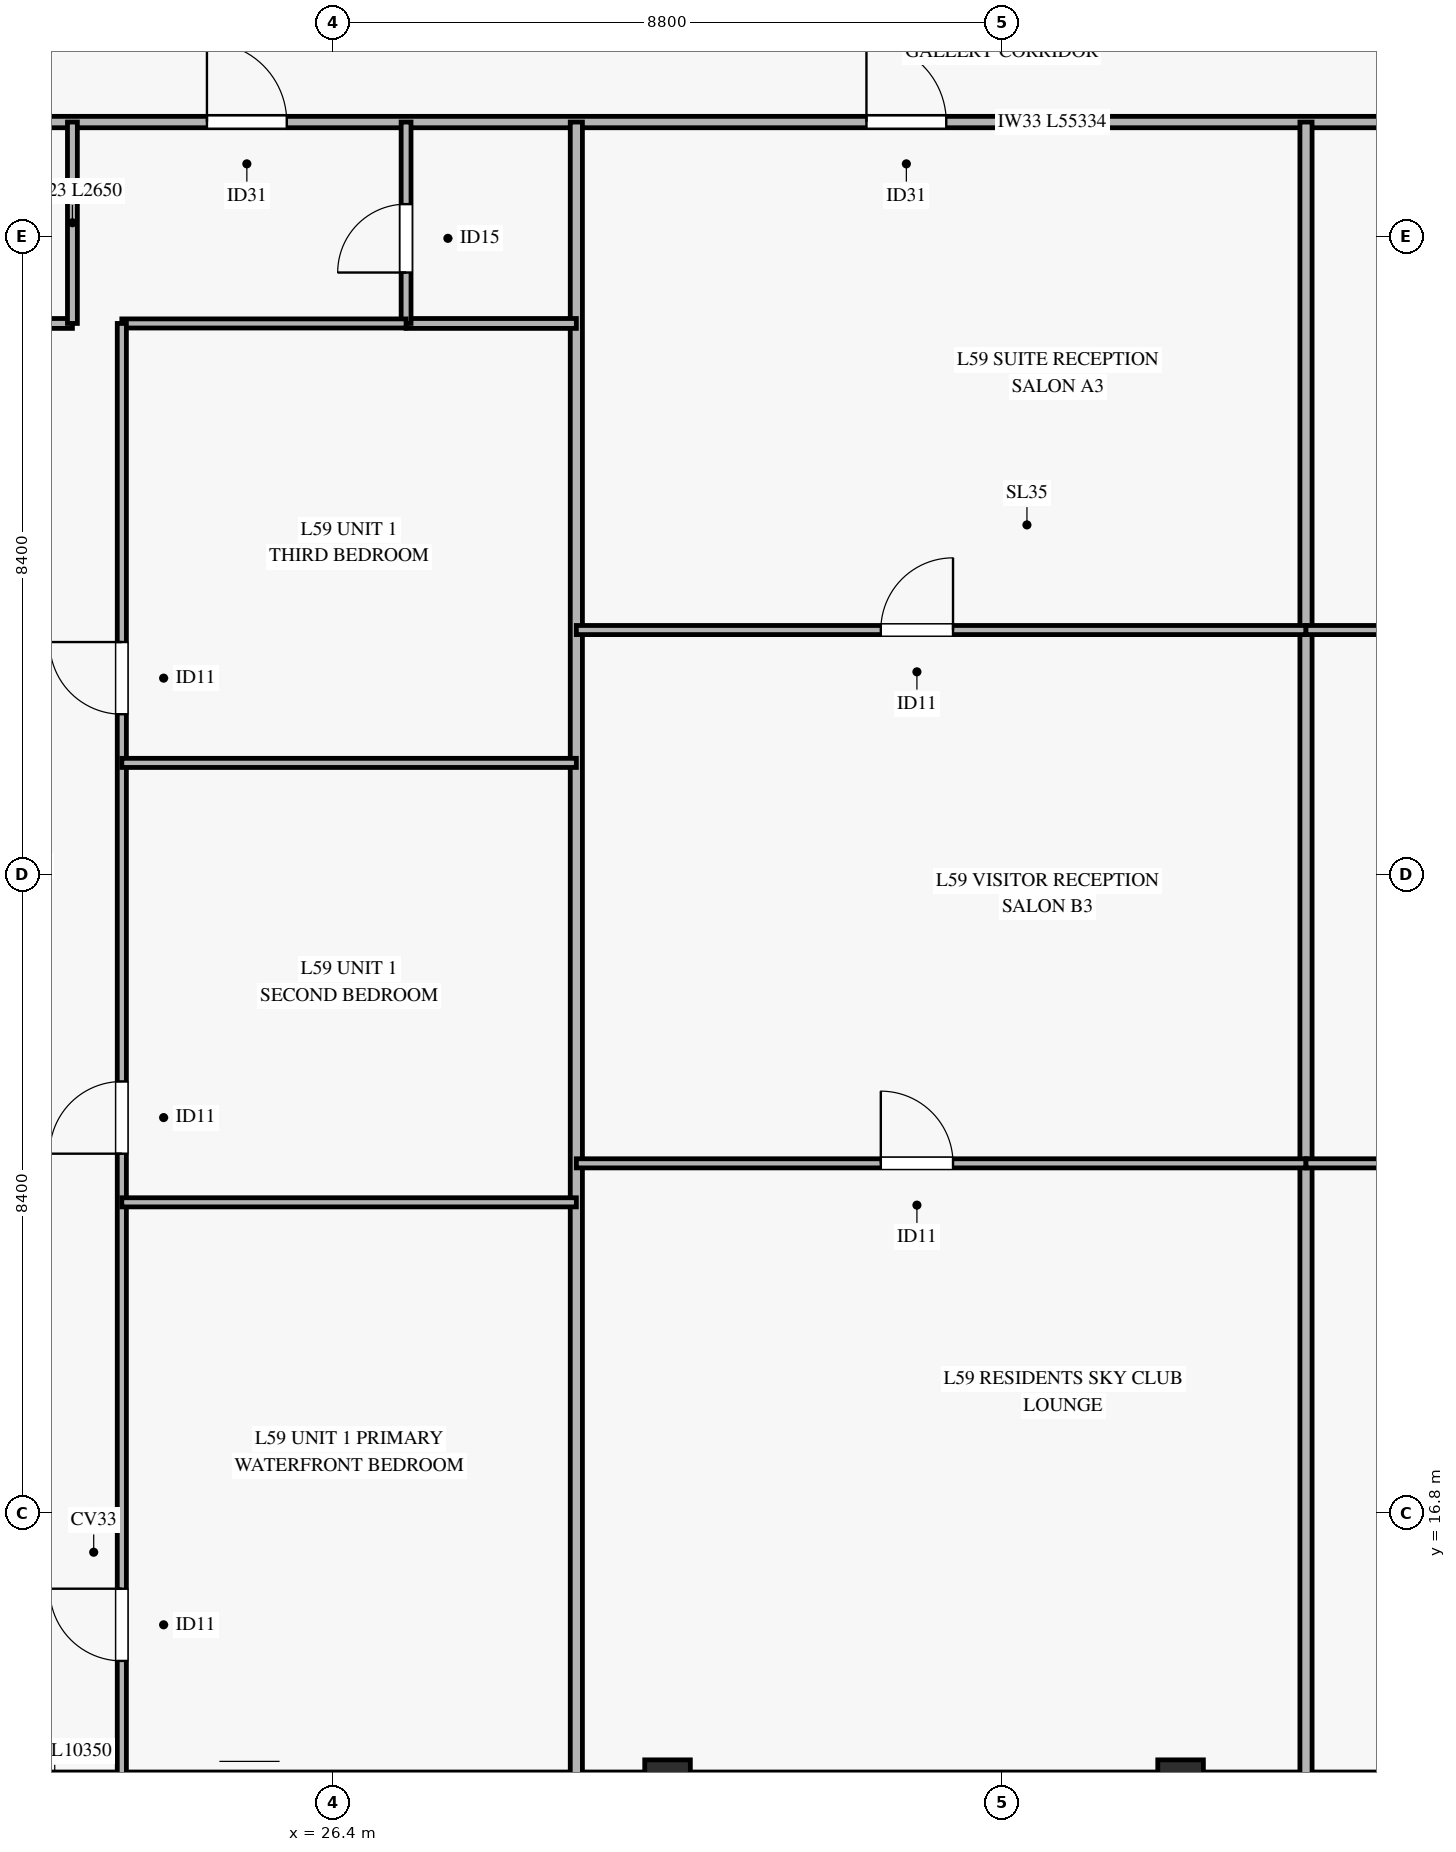
"""IFC4 building model, lengths in metres.
Left out: names, types, materials, properties, quantities, classifications, styles, units other than length and angle.
Written with IfcOpenShell. Run it as: python <this file> out.ifc"""

import sys

from ifc_helpers import new_model, si_unit, direction, frame, frame_2d, origin, origin_2d, place, context, subcontext, project, spatial, rectangle, hollow_rectangle, extrude, source, transform, mapped, element, fill, save


model = new_model("IFC4")
c1 = context("Model", 3, precision=1e-05, world=origin(), true_north=direction((0.0, 1.0)))
c2 = subcontext(c1, "Body", "Model", "MODEL_VIEW")
j1 = project(units=[si_unit("LENGTHUNIT", "METRE"), si_unit("PLANEANGLEUNIT", "RADIAN")], contexts=[c1])
p1 = place(None, origin())
s1 = spatial("IfcSite", under=j1, at=p1, CompositionType="ELEMENT")
p2 = place(p1, origin())
s2 = spatial("IfcBuilding", under=s1, at=p2, CompositionType="ELEMENT")
p3 = place(p2, frame((0.0, 0.0, 233.8)))
s3 = spatial("IfcBuildingStorey", under=s2, at=p3, CompositionType="ELEMENT", Elevation=233.8)
m1 = source(origin(), c2, "Body", "SweptSolid", [
    extrude(hollow_rectangle(XDim=0.6, YDim=0.6, WallThickness=0.028, at=origin_2d()), origin(), (0.0, 0.0, 1.0), 3.256),
])
for number, where, z_axis, x_axis in (
    (1, (30.8, 13.25, 0.0), (0.0, 0.286, 0.958), (-1.0, 0.0, 0.0)),
    (2, (37.55, 13.25, 0.0), (0.0, 0.286, 0.958), (-1.0, 0.0, 0.0)),
):
    element("IfcColumn", number, at=place(p3, frame(where, z_axis=z_axis, x_axis=x_axis)), inside=s3, PredefinedType="COLUMN", context=c2, shape_type="MappedRepresentation", body=[
        mapped(m1, transform((0.0, 0.0, 0.0), x_axis=(1.0, 0.0, 0.0), y_axis=(0.0, 1.0, 0.0), z_axis=(0.0, 0.0, 1.0), scale=1.0)),
    ])
p4 = place(p3, frame((20.15, 13.25, 0.0), z_axis=(0.0, 0.0, 1.0), x_axis=(1.0, 0.0, 0.0)))
e3 = element("IfcWall", 3, at=p4, inside=s3, PredefinedType="SOLIDWALL", context=c2, shape_type="SweptSolid", body=[
    extrude(rectangle(XDim=10.35, YDim=0.28, at=frame_2d((5.175, 0.0))), origin(), (0.0, 0.0, 1.0), 2.75),
])
p5 = place(p4, frame((4.25, 0.0, 0.0)))
e4 = element("IfcOpeningElement", 4, at=p5, cuts=e3, PredefinedType="OPENING", context=c2, shape_type="SweptSolid", body=[
    extrude(rectangle(XDim=1.8, YDim=2.25, at=frame_2d((0.9, 1.125))), frame((0.0, 0.15, 0.0), z_axis=(0.0, -1.0, 0.0), x_axis=(1.0, 0.0, 0.0)), (0.0, 0.0, 1.0), 0.3),
])
p6 = place(p4, frame((1.27, 0.0, 0.45)))
e5 = element("IfcOpeningElement", 5, at=p6, cuts=e3, PredefinedType="OPENING", context=c2, shape_type="SweptSolid", body=[
    extrude(rectangle(XDim=1.6, YDim=2.0, at=frame_2d((0.8, 1.0))), frame((0.0, 0.15, 0.0), z_axis=(0.0, -1.0, 0.0), x_axis=(1.0, 0.0, 0.0)), (0.0, 0.0, 1.0), 0.3),
])
p7 = place(p4, frame((7.35, 0.0, 0.45)))
e6 = element("IfcOpeningElement", 6, at=p7, cuts=e3, PredefinedType="OPENING", context=c2, shape_type="SweptSolid", body=[
    extrude(rectangle(XDim=1.6, YDim=2.0, at=frame_2d((0.8, 1.0))), frame((0.0, 0.15, 0.0), z_axis=(0.0, -1.0, 0.0), x_axis=(1.0, 0.0, 0.0)), (0.0, 0.0, 1.0), 0.3),
])
for number, where, z_axis, x_axis in (
    (7, (31.1, 13.25, 0.0), (0.0, 0.0, 1.0), (1.0, 0.0, 0.0)),
    (8, (37.85, 13.25, 0.0), (0.0, 0.0, 1.0), (1.0, 0.0, 0.0)),
):
    element("IfcWall", number, at=place(p3, frame(where, z_axis=z_axis, x_axis=x_axis)), inside=s3, PredefinedType="SOLIDWALL", context=c2, shape_type="SweptSolid", body=[
        extrude(rectangle(XDim=6.15, YDim=0.28, at=frame_2d((3.075, 0.0))), origin(), (0.0, 0.0, 1.0), 2.75),
    ])
p8 = place(p3, frame((7.533, 35.1, 0.0), z_axis=(0.0, 0.0, 1.0), x_axis=(1.0, 0.0, 0.0)))
e9 = element("IfcWall", 9, at=p8, inside=s3, PredefinedType="PARTITIONING", context=c2, shape_type="SweptSolid", body=[
    extrude(rectangle(XDim=55.334, YDim=0.15, at=frame_2d((27.667, 0.0))), origin(), (0.0, 0.0, 1.0), 2.305),
])
p9 = place(p8, frame((5.592, 0.0, 0.0)))
e10 = element("IfcOpeningElement", 10, at=p9, cuts=e9, PredefinedType="OPENING", context=c2, shape_type="SweptSolid", body=[
    extrude(rectangle(XDim=1.05, YDim=2.15, at=frame_2d((0.525, 1.075))), frame((0.0, 0.085, 0.0), z_axis=(0.0, -1.0, 0.0), x_axis=(1.0, 0.0, 0.0)), (0.0, 0.0, 1.0), 0.17),
])
p10 = place(p8, frame((17.207, 0.0, 0.0)))
e11 = element("IfcOpeningElement", 11, at=p10, cuts=e9, PredefinedType="OPENING", context=c2, shape_type="SweptSolid", body=[
    extrude(rectangle(XDim=1.05, YDim=2.15, at=frame_2d((0.525, 1.075))), frame((0.0, 0.085, 0.0), z_axis=(0.0, -1.0, 0.0), x_axis=(1.0, 0.0, 0.0)), (0.0, 0.0, 1.0), 0.17),
])
p11 = place(p8, frame((25.884, 0.0, 0.0)))
e12 = element("IfcOpeningElement", 12, at=p11, cuts=e9, PredefinedType="OPENING", context=c2, shape_type="SweptSolid", body=[
    extrude(rectangle(XDim=1.05, YDim=2.15, at=frame_2d((0.525, 1.075))), frame((0.0, 0.085, 0.0), z_axis=(0.0, -1.0, 0.0), x_axis=(1.0, 0.0, 0.0)), (0.0, 0.0, 1.0), 0.17),
])
p12 = place(p8, frame((35.712, 0.0, 0.0)))
e13 = element("IfcOpeningElement", 13, at=p12, cuts=e9, PredefinedType="OPENING", context=c2, shape_type="SweptSolid", body=[
    extrude(rectangle(XDim=1.05, YDim=2.15, at=frame_2d((0.525, 1.075))), frame((0.0, 0.085, 0.0), z_axis=(0.0, -1.0, 0.0), x_axis=(1.0, 0.0, 0.0)), (0.0, 0.0, 1.0), 0.17),
])
p13 = place(p8, frame((46.92, 0.0, 0.0)))
e14 = element("IfcOpeningElement", 14, at=p13, cuts=e9, PredefinedType="OPENING", context=c2, shape_type="SweptSolid", body=[
    extrude(rectangle(XDim=1.05, YDim=2.15, at=frame_2d((0.525, 1.075))), frame((0.0, 0.085, 0.0), z_axis=(0.0, -1.0, 0.0), x_axis=(1.0, 0.0, 0.0)), (0.0, 0.0, 1.0), 0.17),
])
for number, where, z_axis, x_axis in (
    (15, (29.6, 13.25, 0.0), (0.0, 0.0, 1.0), (0.0, 1.0, 0.0)),
    (16, (39.2, 13.25, 0.0), (0.0, 0.0, 1.0), (0.0, 1.0, 0.0)),
):
    element("IfcWall", number, at=place(p3, frame(where, z_axis=z_axis, x_axis=x_axis)), inside=s3, PredefinedType="PARTITIONING", context=c2, shape_type="SweptSolid", body=[
        extrude(rectangle(XDim=21.85, YDim=0.16, at=frame_2d((10.925, 0.0))), origin(), (0.0, 0.0, 1.0), 2.705),
    ])
p14 = place(p3, frame((20.8, 32.45, 0.0), z_axis=(0.0, 0.0, 1.0), x_axis=(1.0, 0.0, 0.0)))
e17 = element("IfcWall", 17, at=p14, inside=s3, PredefinedType="PARTITIONING", context=c2, shape_type="SweptSolid", body=[
    extrude(rectangle(XDim=2.17, YDim=0.13, at=frame_2d((1.085, 0.0))), origin(), (0.0, 0.0, 1.0), 3.12),
])
p15 = place(p14, frame((0.73, 0.0, 0.0)))
e18 = element("IfcOpeningElement", 18, at=p15, cuts=e17, PredefinedType="OPENING", context=c2, shape_type="SweptSolid", body=[
    extrude(rectangle(XDim=0.95, YDim=2.1, at=frame_2d((0.475, 1.05))), frame((0.0, 0.075, 0.0), z_axis=(0.0, -1.0, 0.0), x_axis=(1.0, 0.0, 0.0)), (0.0, 0.0, 1.0), 0.15),
])
p16 = place(p3, frame((22.97, 32.45, 0.0), z_axis=(0.0, 0.0, 1.0), x_axis=(0.0, 1.0, 0.0)))
e19 = element("IfcWall", 19, at=p16, inside=s3, PredefinedType="PARTITIONING", context=c2, shape_type="SweptSolid", body=[
    extrude(rectangle(XDim=2.65, YDim=0.13, at=frame_2d((1.325, 0.0))), origin(), (0.0, 0.0, 1.0), 2.705),
])
p17 = place(p3, frame((27.36, 32.45, 0.0), z_axis=(0.0, 0.0, 1.0), x_axis=(1.0, 0.0, 0.0)))
e20 = element("IfcWall", 20, at=p17, inside=s3, PredefinedType="PARTITIONING", context=c2, shape_type="SweptSolid", body=[
    extrude(rectangle(XDim=2.24, YDim=0.13, at=frame_2d((1.12, 0.0))), origin(), (0.0, 0.0, 1.0), 3.12),
])
p18 = place(p3, frame((27.36, 32.45, 0.0), z_axis=(0.0, 0.0, 1.0), x_axis=(0.0, 1.0, 0.0)))
e21 = element("IfcWall", 21, at=p18, inside=s3, PredefinedType="PARTITIONING", context=c2, shape_type="SweptSolid", body=[
    extrude(rectangle(XDim=2.65, YDim=0.13, at=frame_2d((1.325, 0.0))), origin(), (0.0, 0.0, 1.0), 2.705),
])
p19 = place(p18, frame((0.67, 0.0, 0.0)))
e22 = element("IfcOpeningElement", 22, at=p19, cuts=e21, PredefinedType="OPENING", context=c2, shape_type="SweptSolid", body=[
    extrude(rectangle(XDim=0.9, YDim=2.1, at=frame_2d((0.45, 1.05))), frame((0.0, 0.075, 0.0), z_axis=(0.0, -1.0, 0.0), x_axis=(1.0, 0.0, 0.0)), (0.0, 0.0, 1.0), 0.15),
])
p20 = place(p3, frame((23.62, 32.45, 0.0), z_axis=(0.0, 0.0, 1.0), x_axis=(1.0, 0.0, 0.0)))
e23 = element("IfcWall", 23, at=p20, inside=s3, PredefinedType="PARTITIONING", context=c2, shape_type="SweptSolid", body=[
    extrude(rectangle(XDim=3.74, YDim=0.12, at=frame_2d((1.87, 0.0))), origin(), (0.0, 0.0, 1.0), 3.12),
])
p21 = place(p3, frame((23.62, 13.25, 0.0), z_axis=(0.0, 0.0, 1.0), x_axis=(0.0, 1.0, 0.0)))
e24 = element("IfcWall", 24, at=p21, inside=s3, PredefinedType="PARTITIONING", context=c2, shape_type="SweptSolid", body=[
    extrude(rectangle(XDim=19.2, YDim=0.12, at=frame_2d((9.6, 0.0))), origin(), (0.0, 0.0, 1.0), 2.705),
])
p22 = place(p21, frame((1.602, 0.0, 0.0)))
e25 = element("IfcOpeningElement", 25, at=p22, cuts=e24, PredefinedType="OPENING", context=c2, shape_type="SweptSolid", body=[
    extrude(rectangle(XDim=0.95, YDim=2.1, at=frame_2d((0.475, 1.05))), frame((0.0, 0.07, 0.0), z_axis=(0.0, -1.0, 0.0), x_axis=(1.0, 0.0, 0.0)), (0.0, 0.0, 1.0), 0.14),
])
p23 = place(p21, frame((8.276, 0.0, 0.0)))
e26 = element("IfcOpeningElement", 26, at=p23, cuts=e24, PredefinedType="OPENING", context=c2, shape_type="SweptSolid", body=[
    extrude(rectangle(XDim=0.95, YDim=2.1, at=frame_2d((0.475, 1.05))), frame((0.0, 0.07, 0.0), z_axis=(0.0, -1.0, 0.0), x_axis=(1.0, 0.0, 0.0)), (0.0, 0.0, 1.0), 0.14),
])
p24 = place(p21, frame((14.058, 0.0, 0.0)))
e27 = element("IfcOpeningElement", 27, at=p24, cuts=e24, PredefinedType="OPENING", context=c2, shape_type="SweptSolid", body=[
    extrude(rectangle(XDim=0.95, YDim=2.1, at=frame_2d((0.475, 1.05))), frame((0.0, 0.07, 0.0), z_axis=(0.0, -1.0, 0.0), x_axis=(1.0, 0.0, 0.0)), (0.0, 0.0, 1.0), 0.14),
])
for number, where, z_axis, x_axis in (
    (28, (23.62, 20.886, 0.0), (0.0, 0.0, 1.0), (1.0, 0.0, 0.0)),
    (29, (23.62, 26.668, 0.0), (0.0, 0.0, 1.0), (1.0, 0.0, 0.0)),
):
    element("IfcWall", number, at=place(p3, frame(where, z_axis=z_axis, x_axis=x_axis)), inside=s3, PredefinedType="PARTITIONING", context=c2, shape_type="SweptSolid", body=[
        extrude(rectangle(XDim=5.98, YDim=0.12, at=frame_2d((2.99, 0.0))), origin(), (0.0, 0.0, 1.0), 3.12),
    ])
p25 = place(p3, frame((29.6, 21.399, 0.0), z_axis=(0.0, 0.0, 1.0), x_axis=(1.0, 0.0, 0.0)))
e30 = element("IfcWall", 30, at=p25, inside=s3, PredefinedType="PARTITIONING", context=c2, shape_type="SweptSolid", body=[
    extrude(rectangle(XDim=9.6, YDim=0.12, at=frame_2d((4.8, 0.0))), origin(), (0.0, 0.0, 1.0), 2.305),
])
p26 = place(p25, frame((4.006, 0.0, 0.0)))
e31 = element("IfcOpeningElement", 31, at=p26, cuts=e30, PredefinedType="OPENING", context=c2, shape_type="SweptSolid", body=[
    extrude(rectangle(XDim=0.95, YDim=2.1, at=frame_2d((0.475, 1.05))), frame((0.0, 0.07, 0.0), z_axis=(0.0, -1.0, 0.0), x_axis=(1.0, 0.0, 0.0)), (0.0, 0.0, 1.0), 0.14),
])
p27 = place(p3, frame((29.6, 28.416, 0.0), z_axis=(0.0, 0.0, 1.0), x_axis=(1.0, 0.0, 0.0)))
e32 = element("IfcWall", 32, at=p27, inside=s3, PredefinedType="PARTITIONING", context=c2, shape_type="SweptSolid", body=[
    extrude(rectangle(XDim=9.6, YDim=0.12, at=frame_2d((4.8, 0.0))), origin(), (0.0, 0.0, 1.0), 2.305),
])
p28 = place(p27, frame((4.006, 0.0, 0.0)))
e33 = element("IfcOpeningElement", 33, at=p28, cuts=e32, PredefinedType="OPENING", context=c2, shape_type="SweptSolid", body=[
    extrude(rectangle(XDim=0.95, YDim=2.1, at=frame_2d((0.475, 1.05))), frame((0.0, 0.07, 0.0), z_axis=(0.0, -1.0, 0.0), x_axis=(1.0, 0.0, 0.0)), (0.0, 0.0, 1.0), 0.14),
])
p29 = place(p3, frame((39.2, 21.399, 0.0), z_axis=(0.0, 0.0, 1.0), x_axis=(1.0, 0.0, 0.0)))
e34 = element("IfcWall", 34, at=p29, inside=s3, PredefinedType="PARTITIONING", context=c2, shape_type="SweptSolid", body=[
    extrude(rectangle(XDim=10.2, YDim=0.12, at=frame_2d((5.1, 0.0))), origin(), (0.0, 0.0, 1.0), 2.305),
])
p30 = place(p29, frame((4.246, 0.0, 0.0)))
e35 = element("IfcOpeningElement", 35, at=p30, cuts=e34, PredefinedType="OPENING", context=c2, shape_type="SweptSolid", body=[
    extrude(rectangle(XDim=0.95, YDim=2.1, at=frame_2d((0.475, 1.05))), frame((0.0, 0.07, 0.0), z_axis=(0.0, -1.0, 0.0), x_axis=(1.0, 0.0, 0.0)), (0.0, 0.0, 1.0), 0.14),
])
p31 = place(p3, frame((39.2, 28.416, 0.0), z_axis=(0.0, 0.0, 1.0), x_axis=(1.0, 0.0, 0.0)))
e36 = element("IfcWall", 36, at=p31, inside=s3, PredefinedType="PARTITIONING", context=c2, shape_type="SweptSolid", body=[
    extrude(rectangle(XDim=10.2, YDim=0.12, at=frame_2d((5.1, 0.0))), origin(), (0.0, 0.0, 1.0), 2.305),
])
p32 = place(p31, frame((4.246, 0.0, 0.0)))
e37 = element("IfcOpeningElement", 37, at=p32, cuts=e36, PredefinedType="OPENING", context=c2, shape_type="SweptSolid", body=[
    extrude(rectangle(XDim=0.95, YDim=2.1, at=frame_2d((0.475, 1.05))), frame((0.0, 0.07, 0.0), z_axis=(0.0, -1.0, 0.0), x_axis=(1.0, 0.0, 0.0)), (0.0, 0.0, 1.0), 0.14),
])
m2 = source(origin(), c2, "Body", "SweptSolid", [
    extrude(rectangle(XDim=1.05, YDim=2.15, at=frame_2d((0.525, 1.075))), frame((0.0, 0.025, 0.0), z_axis=(0.0, -1.0, 0.0), x_axis=(1.0, 0.0, 0.0)), (0.0, 0.0, 1.0), 0.05),
])
p33 = place(p10, origin())
e38 = element("IfcDoor", 38, at=p33, inside=s3, OperationType="SINGLE_SWING_LEFT", PredefinedType="DOOR", context=c2, shape_type="MappedRepresentation", body=[
    mapped(m2, transform((0.0, 0.0, 0.0), x_axis=(1.0, 0.0, 0.0), y_axis=(0.0, 1.0, 0.0), z_axis=(0.0, 0.0, 1.0), scale=1.0)),
])
fill(e11, e38)
m3 = source(origin(), c2, "Body", "SweptSolid", [
    extrude(rectangle(XDim=0.9, YDim=2.1, at=frame_2d((0.45, 1.05))), frame((0.0, 0.025, 0.0), z_axis=(0.0, -1.0, 0.0), x_axis=(1.0, 0.0, 0.0)), (0.0, 0.0, 1.0), 0.05),
])
p34 = place(p19, origin())
e39 = element("IfcDoor", 39, at=p34, inside=s3, OperationType="SINGLE_SWING_LEFT", PredefinedType="DOOR", context=c2, shape_type="MappedRepresentation", body=[
    mapped(m3, transform((0.0, 0.0, 0.0), x_axis=(1.0, 0.0, 0.0), y_axis=(0.0, 1.0, 0.0), z_axis=(0.0, 0.0, 1.0), scale=1.0)),
])
fill(e22, e39)
m4 = source(origin(), c2, "Body", "SweptSolid", [
    extrude(rectangle(XDim=0.95, YDim=2.1, at=frame_2d((0.475, 1.05))), frame((0.0, 0.025, 0.0), z_axis=(0.0, -1.0, 0.0), x_axis=(1.0, 0.0, 0.0)), (0.0, 0.0, 1.0), 0.05),
])
p35 = place(p22, origin())
e40 = element("IfcDoor", 40, at=p35, inside=s3, OperationType="SINGLE_SWING_RIGHT", PredefinedType="DOOR", context=c2, shape_type="MappedRepresentation", body=[
    mapped(m4, transform((0.0, 0.0, 0.0), x_axis=(1.0, 0.0, 0.0), y_axis=(0.0, 1.0, 0.0), z_axis=(0.0, 0.0, 1.0), scale=1.0)),
])
fill(e25, e40)
p36 = place(p23, origin())
e41 = element("IfcDoor", 41, at=p36, inside=s3, OperationType="SINGLE_SWING_LEFT", PredefinedType="DOOR", context=c2, shape_type="MappedRepresentation", body=[
    mapped(m4, transform((0.0, 0.0, 0.0), x_axis=(1.0, 0.0, 0.0), y_axis=(0.0, 1.0, 0.0), z_axis=(0.0, 0.0, 1.0), scale=1.0)),
])
fill(e26, e41)
p37 = place(p24, origin())
e42 = element("IfcDoor", 42, at=p37, inside=s3, OperationType="SINGLE_SWING_RIGHT", PredefinedType="DOOR", context=c2, shape_type="MappedRepresentation", body=[
    mapped(m4, transform((0.0, 0.0, 0.0), x_axis=(1.0, 0.0, 0.0), y_axis=(0.0, 1.0, 0.0), z_axis=(0.0, 0.0, 1.0), scale=1.0)),
])
fill(e27, e42)
p38 = place(p11, origin())
e43 = element("IfcDoor", 43, at=p38, inside=s3, OperationType="SINGLE_SWING_LEFT", PredefinedType="DOOR", context=c2, shape_type="MappedRepresentation", body=[
    mapped(m2, transform((0.0, 0.0, 0.0), x_axis=(1.0, 0.0, 0.0), y_axis=(0.0, 1.0, 0.0), z_axis=(0.0, 0.0, 1.0), scale=1.0)),
])
fill(e12, e43)
p39 = place(p28, origin())
e44 = element("IfcDoor", 44, at=p39, inside=s3, OperationType="SINGLE_SWING_RIGHT", PredefinedType="DOOR", context=c2, shape_type="MappedRepresentation", body=[
    mapped(m4, transform((0.0, 0.0, 0.0), x_axis=(1.0, 0.0, 0.0), y_axis=(0.0, 1.0, 0.0), z_axis=(0.0, 0.0, 1.0), scale=1.0)),
])
fill(e33, e44)
p40 = place(p26, origin())
e45 = element("IfcDoor", 45, at=p40, inside=s3, OperationType="SINGLE_SWING_LEFT", PredefinedType="DOOR", context=c2, shape_type="MappedRepresentation", body=[
    mapped(m4, transform((0.0, 0.0, 0.0), x_axis=(1.0, 0.0, 0.0), y_axis=(0.0, 1.0, 0.0), z_axis=(0.0, 0.0, 1.0), scale=1.0)),
])
fill(e31, e45)
save(model, sys.argv[1])
